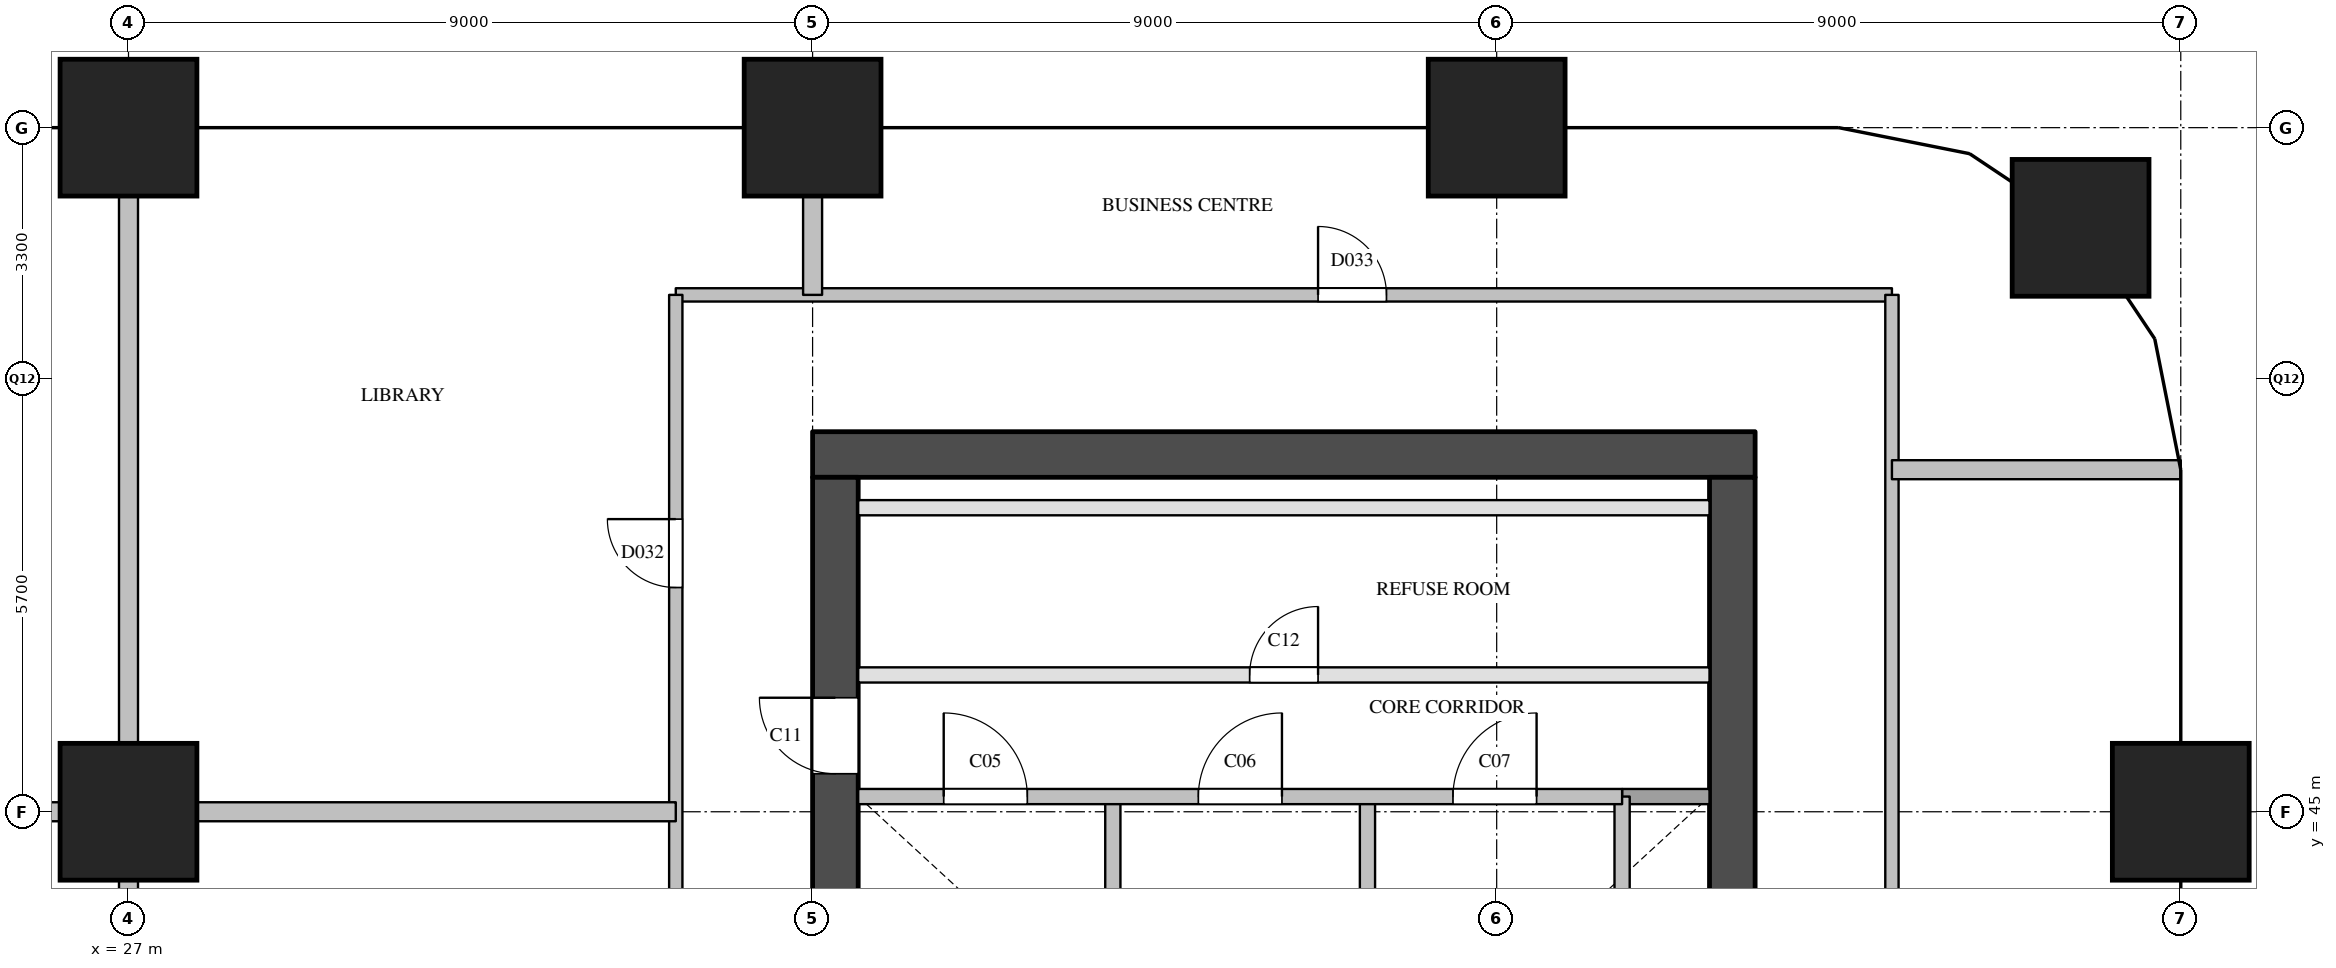
"""IFC4 building model, lengths in metres.
Left out: names, types, materials, properties, quantities, classifications, styles, units other than length and angle.
Written with IfcOpenShell. Run it as: python <this file> out.ifc"""

import sys

from ifc_helpers import new_model, si_unit, direction, frame, frame_2d, origin, origin_2d, place, context, subcontext, project, spatial, rectangle, extrude, element, fill, save


model = new_model("IFC4")
c1 = context("Model", 3, precision=1e-05, world=origin(), true_north=direction((0.0, 1.0)))
c2 = subcontext(c1, "Body", "Model", "MODEL_VIEW")
j1 = project(units=[si_unit("LENGTHUNIT", "METRE"), si_unit("PLANEANGLEUNIT", "RADIAN")], contexts=[c1])
p1 = place(None, origin())
s1 = spatial("IfcSite", under=j1, at=p1, CompositionType="ELEMENT")
p2 = place(p1, origin())
s2 = spatial("IfcBuilding", under=s1, at=p2, CompositionType="ELEMENT")
p3 = place(p2, frame((0.0, 0.0, 96.8)))
s3 = spatial("IfcBuildingStorey", under=s2, at=p3, CompositionType="ELEMENT", Elevation=96.8)
for number, where, z_axis, x_axis in (
    (1, (27.0, 45.0, 0.0), (0.0, 0.0, 1.0), (1.0, 0.0, 0.0)),
    (2, (27.0, 54.0, 0.0), (0.0, 0.0, 1.0), (1.0, 0.0, 0.0)),
    (3, (36.0, 54.0, 0.0), (0.0, 0.0, 1.0), (1.0, 0.0, 0.0)),
    (4, (45.0, 54.0, 0.0), (0.0, 0.0, 1.0), (1.0, 0.0, 0.0)),
    (5, (54.0, 45.0, 0.0), (0.0, 0.0, 1.0), (1.0, 0.0, 0.0)),
    (6, (52.682, 52.682, 0.0), (0.0, 0.0, 1.0), (1.0, 0.0, 0.0)),
):
    element("IfcColumn", number, at=place(p3, frame(where, z_axis=z_axis, x_axis=x_axis)), inside=s3, PredefinedType="COLUMN", context=c2, shape_type="SweptSolid", body=[
        extrude(rectangle(XDim=1.8, YDim=1.8, at=origin_2d()), origin(), (0.0, 0.0, 1.0), 3.8),
    ])
p4 = place(p3, frame((36.0, 49.7, 0.0), z_axis=(0.0, 0.0, 1.0), x_axis=(1.0, 0.0, 0.0)))
e7 = element("IfcWall", 7, at=p4, inside=s3, PredefinedType="SHEAR", context=c2, shape_type="SweptSolid", body=[
    extrude(rectangle(XDim=12.4, YDim=0.6, at=frame_2d((6.2, 0.0))), origin(), (0.0, 0.0, 1.0), 3.5),
])
p5 = place(p3, frame((36.3, 29.1, 0.0), z_axis=(0.0, 0.0, 1.0), x_axis=(0.0, 1.0, 0.0)))
e8 = element("IfcWall", 8, at=p5, inside=s3, PredefinedType="SHEAR", context=c2, shape_type="SweptSolid", body=[
    extrude(rectangle(XDim=20.3, YDim=0.6, at=frame_2d((10.15, 0.0))), origin(), (0.0, 0.0, 1.0), 3.5),
])
p6 = place(p5, frame((3.6, 0.0, 0.0)))
e9 = element("IfcOpeningElement", 9, at=p6, cuts=e8, PredefinedType="OPENING", context=c2, shape_type="SweptSolid", body=[
    extrude(rectangle(XDim=1.8, YDim=2.1, at=frame_2d((0.9, 1.05))), frame((0.0, 0.31, 0.0), z_axis=(0.0, -1.0, 0.0), x_axis=(1.0, 0.0, 0.0)), (0.0, 0.0, 1.0), 0.62),
])
p7 = place(p5, frame((16.4, 0.0, 0.0)))
e10 = element("IfcOpeningElement", 10, at=p7, cuts=e8, PredefinedType="OPENING", context=c2, shape_type="SweptSolid", body=[
    extrude(rectangle(XDim=1.0, YDim=2.1, at=frame_2d((0.5, 1.05))), frame((0.0, 0.31, 0.0), z_axis=(0.0, -1.0, 0.0), x_axis=(1.0, 0.0, 0.0)), (0.0, 0.0, 1.0), 0.62),
])
p8 = place(p3, frame((48.1, 29.1, 0.0), z_axis=(0.0, 0.0, 1.0), x_axis=(0.0, 1.0, 0.0)))
e11 = element("IfcWall", 11, at=p8, inside=s3, PredefinedType="SHEAR", context=c2, shape_type="SweptSolid", body=[
    extrude(rectangle(XDim=20.3, YDim=0.6, at=frame_2d((10.15, 0.0))), origin(), (0.0, 0.0, 1.0), 3.5),
])
p9 = place(p8, frame((12.5, 0.0, 0.0)))
e12 = element("IfcOpeningElement", 12, at=p9, cuts=e11, PredefinedType="OPENING", context=c2, shape_type="SweptSolid", body=[
    extrude(rectangle(XDim=0.7, YDim=2.1, at=frame_2d((0.35, 1.05))), frame((0.0, 0.31, 0.0), z_axis=(0.0, -1.0, 0.0), x_axis=(1.0, 0.0, 0.0)), (0.0, 0.0, 1.0), 0.62),
])
p10 = place(p8, frame((3.9, 0.0, 0.0)))
e13 = element("IfcOpeningElement", 13, at=p10, cuts=e11, PredefinedType="OPENING", context=c2, shape_type="SweptSolid", body=[
    extrude(rectangle(XDim=1.8, YDim=2.1, at=frame_2d((0.9, 1.05))), frame((0.0, 0.31, 0.0), z_axis=(0.0, -1.0, 0.0), x_axis=(1.0, 0.0, 0.0)), (0.0, 0.0, 1.0), 0.62),
])
for number, where, z_axis, x_axis in (
    (14, (39.95, 40.78, 0.0), (0.0, 0.0, 1.0), (0.0, 1.0, 0.0)),
    (15, (43.3, 40.78, 0.0), (0.0, 0.0, 1.0), (0.0, 1.0, 0.0)),
    (16, (46.65, 40.78, 0.0), (0.0, 0.0, 1.0), (0.0, 1.0, 0.0)),
):
    element("IfcWall", number, at=place(p3, frame(where, z_axis=z_axis, x_axis=x_axis)), inside=s3, PredefinedType="SOLIDWALL", context=c2, shape_type="SweptSolid", body=[
        extrude(rectangle(XDim=4.42, YDim=0.2, at=frame_2d((2.21, 0.0))), origin(), (0.0, 0.0, 1.0), 3.5),
    ])
p11 = place(p3, frame((46.65, 45.2, 0.0), z_axis=(0.0, 0.0, 1.0), x_axis=(1.0, 0.0, 0.0)))
e17 = element("IfcWall", 17, at=p11, inside=s3, PredefinedType="SOLIDWALL", context=c2, shape_type="SweptSolid", body=[
    extrude(rectangle(XDim=1.15, YDim=0.2, at=frame_2d((0.575, 0.0))), origin(), (0.0, 0.0, 1.0), 3.5),
])
p12 = place(p3, frame((36.6, 45.2, 0.0), z_axis=(0.0, 0.0, 1.0), x_axis=(1.0, 0.0, 0.0)))
e18 = element("IfcWall", 18, at=p12, inside=s3, PredefinedType="SOLIDWALL", context=c2, shape_type="SweptSolid", body=[
    extrude(rectangle(XDim=10.05, YDim=0.2, at=frame_2d((5.025, 0.0))), origin(), (0.0, 0.0, 1.0), 3.5),
])
p13 = place(p12, frame((1.125, 0.0, 0.0)))
e19 = element("IfcOpeningElement", 19, at=p13, cuts=e18, PredefinedType="OPENING", context=c2, shape_type="SweptSolid", body=[
    extrude(rectangle(XDim=1.1, YDim=2.1, at=frame_2d((0.55, 1.05))), frame((0.0, 0.11, 0.0), z_axis=(0.0, -1.0, 0.0), x_axis=(1.0, 0.0, 0.0)), (0.0, 0.0, 1.0), 0.22),
])
p14 = place(p12, frame((4.475, 0.0, 0.0)))
e20 = element("IfcOpeningElement", 20, at=p14, cuts=e18, PredefinedType="OPENING", context=c2, shape_type="SweptSolid", body=[
    extrude(rectangle(XDim=1.1, YDim=2.1, at=frame_2d((0.55, 1.05))), frame((0.0, 0.11, 0.0), z_axis=(0.0, -1.0, 0.0), x_axis=(1.0, 0.0, 0.0)), (0.0, 0.0, 1.0), 0.22),
])
p15 = place(p12, frame((7.825, 0.0, 0.0)))
e21 = element("IfcOpeningElement", 21, at=p15, cuts=e18, PredefinedType="OPENING", context=c2, shape_type="SweptSolid", body=[
    extrude(rectangle(XDim=1.1, YDim=2.1, at=frame_2d((0.55, 1.05))), frame((0.0, 0.11, 0.0), z_axis=(0.0, -1.0, 0.0), x_axis=(1.0, 0.0, 0.0)), (0.0, 0.0, 1.0), 0.22),
])
p16 = place(p3, frame((36.6, 46.8, 0.0), z_axis=(0.0, 0.0, 1.0), x_axis=(1.0, 0.0, 0.0)))
e22 = element("IfcWall", 22, at=p16, inside=s3, PredefinedType="PARTITIONING", context=c2, shape_type="SweptSolid", body=[
    extrude(rectangle(XDim=11.2, YDim=0.2, at=frame_2d((5.6, 0.0))), origin(), (0.0, 0.0, 1.0), 3.5),
])
p17 = place(p16, frame((5.15, 0.0, 0.0)))
e23 = element("IfcOpeningElement", 23, at=p17, cuts=e22, PredefinedType="OPENING", context=c2, shape_type="SweptSolid", body=[
    extrude(rectangle(XDim=0.9, YDim=2.1, at=frame_2d((0.45, 1.05))), frame((0.0, 0.11, 0.0), z_axis=(0.0, -1.0, 0.0), x_axis=(1.0, 0.0, 0.0)), (0.0, 0.0, 1.0), 0.22),
])
p18 = place(p3, frame((36.6, 49.0, 0.0), z_axis=(0.0, 0.0, 1.0), x_axis=(1.0, 0.0, 0.0)))
e24 = element("IfcWall", 24, at=p18, inside=s3, PredefinedType="PARTITIONING", context=c2, shape_type="SweptSolid", body=[
    extrude(rectangle(XDim=11.2, YDim=0.2, at=frame_2d((5.6, 0.0))), origin(), (0.0, 0.0, 1.0), 3.5),
])
p19 = place(p3, frame((34.2, 51.8, 0.0), z_axis=(0.0, 0.0, 1.0), x_axis=(1.0, 0.0, 0.0)))
e25 = element("IfcWall", 25, at=p19, inside=s3, PredefinedType="PARTITIONING", context=c2, shape_type="SweptSolid", body=[
    extrude(rectangle(XDim=16.0, YDim=0.175, at=frame_2d((8.0, 0.0))), origin(), (0.0, 0.0, 1.0), 3.5),
])
p20 = place(p19, frame((8.45, 0.0, 0.0)))
e26 = element("IfcOpeningElement", 26, at=p20, cuts=e25, PredefinedType="OPENING", context=c2, shape_type="SweptSolid", body=[
    extrude(rectangle(XDim=0.9, YDim=2.1, at=frame_2d((0.45, 1.05))), frame((0.0, 0.097, 0.0), z_axis=(0.0, -1.0, 0.0), x_axis=(1.0, 0.0, 0.0)), (0.0, 0.0, 1.0), 0.195),
])
p21 = place(p3, frame((34.2, 29.12, 0.0), z_axis=(0.0, 0.0, 1.0), x_axis=(0.0, 1.0, 0.0)))
e27 = element("IfcWall", 27, at=p21, inside=s3, PredefinedType="PARTITIONING", context=c2, shape_type="SweptSolid", body=[
    extrude(rectangle(XDim=22.68, YDim=0.175, at=frame_2d((11.34, 0.0))), origin(), (0.0, 0.0, 1.0), 3.5),
])
p22 = place(p21, frame((3.08, 0.0, 0.0)))
e28 = element("IfcOpeningElement", 28, at=p22, cuts=e27, PredefinedType="OPENING", context=c2, shape_type="SweptSolid", body=[
    extrude(rectangle(XDim=1.0, YDim=2.1, at=frame_2d((0.5, 1.05))), frame((0.0, 0.097, 0.0), z_axis=(0.0, -1.0, 0.0), x_axis=(1.0, 0.0, 0.0)), (0.0, 0.0, 1.0), 0.195),
])
p23 = place(p21, frame((8.68, 0.0, 0.0)))
e29 = element("IfcOpeningElement", 29, at=p23, cuts=e27, PredefinedType="OPENING", context=c2, shape_type="SweptSolid", body=[
    extrude(rectangle(XDim=0.9, YDim=2.1, at=frame_2d((0.45, 1.05))), frame((0.0, 0.097, 0.0), z_axis=(0.0, -1.0, 0.0), x_axis=(1.0, 0.0, 0.0)), (0.0, 0.0, 1.0), 0.195),
])
p24 = place(p21, frame((13.13, 0.0, 0.0)))
e30 = element("IfcOpeningElement", 30, at=p24, cuts=e27, PredefinedType="OPENING", context=c2, shape_type="SweptSolid", body=[
    extrude(rectangle(XDim=1.0, YDim=2.1, at=frame_2d((0.5, 1.05))), frame((0.0, 0.097, 0.0), z_axis=(0.0, -1.0, 0.0), x_axis=(1.0, 0.0, 0.0)), (0.0, 0.0, 1.0), 0.195),
])
p25 = place(p21, frame((18.83, 0.0, 0.0)))
e31 = element("IfcOpeningElement", 31, at=p25, cuts=e27, PredefinedType="OPENING", context=c2, shape_type="SweptSolid", body=[
    extrude(rectangle(XDim=0.9, YDim=2.1, at=frame_2d((0.45, 1.05))), frame((0.0, 0.097, 0.0), z_axis=(0.0, -1.0, 0.0), x_axis=(1.0, 0.0, 0.0)), (0.0, 0.0, 1.0), 0.195),
])
p26 = place(p3, frame((50.2, 26.7, 0.0), z_axis=(0.0, 0.0, 1.0), x_axis=(0.0, 1.0, 0.0)))
e32 = element("IfcWall", 32, at=p26, inside=s3, PredefinedType="PARTITIONING", context=c2, shape_type="SweptSolid", body=[
    extrude(rectangle(XDim=25.1, YDim=0.175, at=frame_2d((12.55, 0.0))), origin(), (0.0, 0.0, 1.0), 2.5),
])
p27 = place(p26, frame((4.2, 0.0, 0.0)))
e33 = element("IfcOpeningElement", 33, at=p27, cuts=e32, PredefinedType="OPENING", context=c2, shape_type="SweptSolid", body=[
    extrude(rectangle(XDim=0.9, YDim=2.1, at=frame_2d((0.45, 1.05))), frame((0.0, 0.097, 0.0), z_axis=(0.0, -1.0, 0.0), x_axis=(1.0, 0.0, 0.0)), (0.0, 0.0, 1.0), 0.195),
])
p28 = place(p26, frame((15.6, 0.0, 0.0)))
e34 = element("IfcOpeningElement", 34, at=p28, cuts=e32, PredefinedType="OPENING", context=c2, shape_type="SweptSolid", body=[
    extrude(rectangle(XDim=0.9, YDim=2.1, at=frame_2d((0.45, 1.05))), frame((0.0, 0.097, 0.0), z_axis=(0.0, -1.0, 0.0), x_axis=(1.0, 0.0, 0.0)), (0.0, 0.0, 1.0), 0.195),
])
p29 = place(p3, frame((19.8, 45.0, 0.0), z_axis=(0.0, 0.0, 1.0), x_axis=(1.0, 0.0, 0.0)))
e35 = element("IfcWall", 35, at=p29, inside=s3, PredefinedType="PARTITIONING", context=c2, shape_type="SweptSolid", body=[
    extrude(rectangle(XDim=14.4, YDim=0.25, at=frame_2d((7.2, 0.0))), origin(), (0.0, 0.0, 1.0), 3.5),
])
p30 = place(p3, frame((50.2, 49.5, 0.0), z_axis=(0.0, 0.0, 1.0), x_axis=(1.0, 0.0, 0.0)))
e36 = element("IfcWall", 36, at=p30, inside=s3, PredefinedType="PARTITIONING", context=c2, shape_type="SweptSolid", body=[
    extrude(rectangle(XDim=3.8, YDim=0.25, at=frame_2d((1.9, 0.0))), origin(), (0.0, 0.0, 1.0), 2.5),
])
p31 = place(p3, frame((27.0, 36.0, 0.0), z_axis=(0.0, 0.0, 1.0), x_axis=(0.0, 1.0, 0.0)))
e37 = element("IfcWall", 37, at=p31, inside=s3, PredefinedType="PARTITIONING", context=c2, shape_type="SweptSolid", body=[
    extrude(rectangle(XDim=18.0, YDim=0.25, at=frame_2d((9.0, 0.0))), origin(), (0.0, 0.0, 1.0), 2.5),
])
p32 = place(p3, frame((36.0, 51.8, 0.0), z_axis=(0.0, 0.0, 1.0), x_axis=(0.0, 1.0, 0.0)))
e38 = element("IfcWall", 38, at=p32, inside=s3, PredefinedType="PARTITIONING", context=c2, shape_type="SweptSolid", body=[
    extrude(rectangle(XDim=2.2, YDim=0.25, at=frame_2d((1.1, 0.0))), origin(), (0.0, 0.0, 1.0), 3.5),
])
p33 = place(p13, origin())
e39 = element("IfcDoor", 39, at=p33, inside=s3, OperationType="SINGLE_SWING_LEFT", PredefinedType="DOOR", context=c2, shape_type="SweptSolid", body=[
    extrude(rectangle(XDim=1.1, YDim=2.1, at=frame_2d((0.55, 1.05))), frame((0.0, 0.025, 0.0), z_axis=(0.0, -1.0, 0.0), x_axis=(1.0, 0.0, 0.0)), (0.0, 0.0, 1.0), 0.05),
])
fill(e19, e39)
p34 = place(p14, origin())
e40 = element("IfcDoor", 40, at=p34, inside=s3, OperationType="SINGLE_SWING_RIGHT", PredefinedType="DOOR", context=c2, shape_type="SweptSolid", body=[
    extrude(rectangle(XDim=1.1, YDim=2.1, at=frame_2d((0.55, 1.05))), frame((0.0, 0.025, 0.0), z_axis=(0.0, -1.0, 0.0), x_axis=(1.0, 0.0, 0.0)), (0.0, 0.0, 1.0), 0.05),
])
fill(e20, e40)
p35 = place(p15, origin())
e41 = element("IfcDoor", 41, at=p35, inside=s3, OperationType="SINGLE_SWING_RIGHT", PredefinedType="DOOR", context=c2, shape_type="SweptSolid", body=[
    extrude(rectangle(XDim=1.1, YDim=2.1, at=frame_2d((0.55, 1.05))), frame((0.0, 0.025, 0.0), z_axis=(0.0, -1.0, 0.0), x_axis=(1.0, 0.0, 0.0)), (0.0, 0.0, 1.0), 0.05),
])
fill(e21, e41)
p36 = place(p7, origin())
e42 = element("IfcDoor", 42, at=p36, inside=s3, OperationType="SINGLE_SWING_RIGHT", PredefinedType="DOOR", context=c2, shape_type="SweptSolid", body=[
    extrude(rectangle(XDim=1.0, YDim=2.1, at=frame_2d((0.5, 1.05))), frame((0.0, 0.025, 0.0), z_axis=(0.0, -1.0, 0.0), x_axis=(1.0, 0.0, 0.0)), (0.0, 0.0, 1.0), 0.05),
])
fill(e10, e42)
p37 = place(p17, origin())
e43 = element("IfcDoor", 43, at=p37, inside=s3, OperationType="SINGLE_SWING_RIGHT", PredefinedType="DOOR", context=c2, shape_type="SweptSolid", body=[
    extrude(rectangle(XDim=0.9, YDim=2.1, at=frame_2d((0.45, 1.05))), frame((0.0, 0.025, 0.0), z_axis=(0.0, -1.0, 0.0), x_axis=(1.0, 0.0, 0.0)), (0.0, 0.0, 1.0), 0.05),
])
fill(e23, e43)
p38 = place(p25, origin())
e44 = element("IfcDoor", 44, at=p38, inside=s3, OperationType="SINGLE_SWING_RIGHT", PredefinedType="DOOR", context=c2, shape_type="SweptSolid", body=[
    extrude(rectangle(XDim=0.9, YDim=2.1, at=frame_2d((0.45, 1.05))), frame((0.0, 0.025, 0.0), z_axis=(0.0, -1.0, 0.0), x_axis=(1.0, 0.0, 0.0)), (0.0, 0.0, 1.0), 0.05),
])
fill(e31, e44)
p39 = place(p20, origin())
e45 = element("IfcDoor", 45, at=p39, inside=s3, OperationType="SINGLE_SWING_LEFT", PredefinedType="DOOR", context=c2, shape_type="SweptSolid", body=[
    extrude(rectangle(XDim=0.9, YDim=2.1, at=frame_2d((0.45, 1.05))), frame((0.0, 0.025, 0.0), z_axis=(0.0, -1.0, 0.0), x_axis=(1.0, 0.0, 0.0)), (0.0, 0.0, 1.0), 0.05),
])
fill(e26, e45)
save(model, sys.argv[1])
